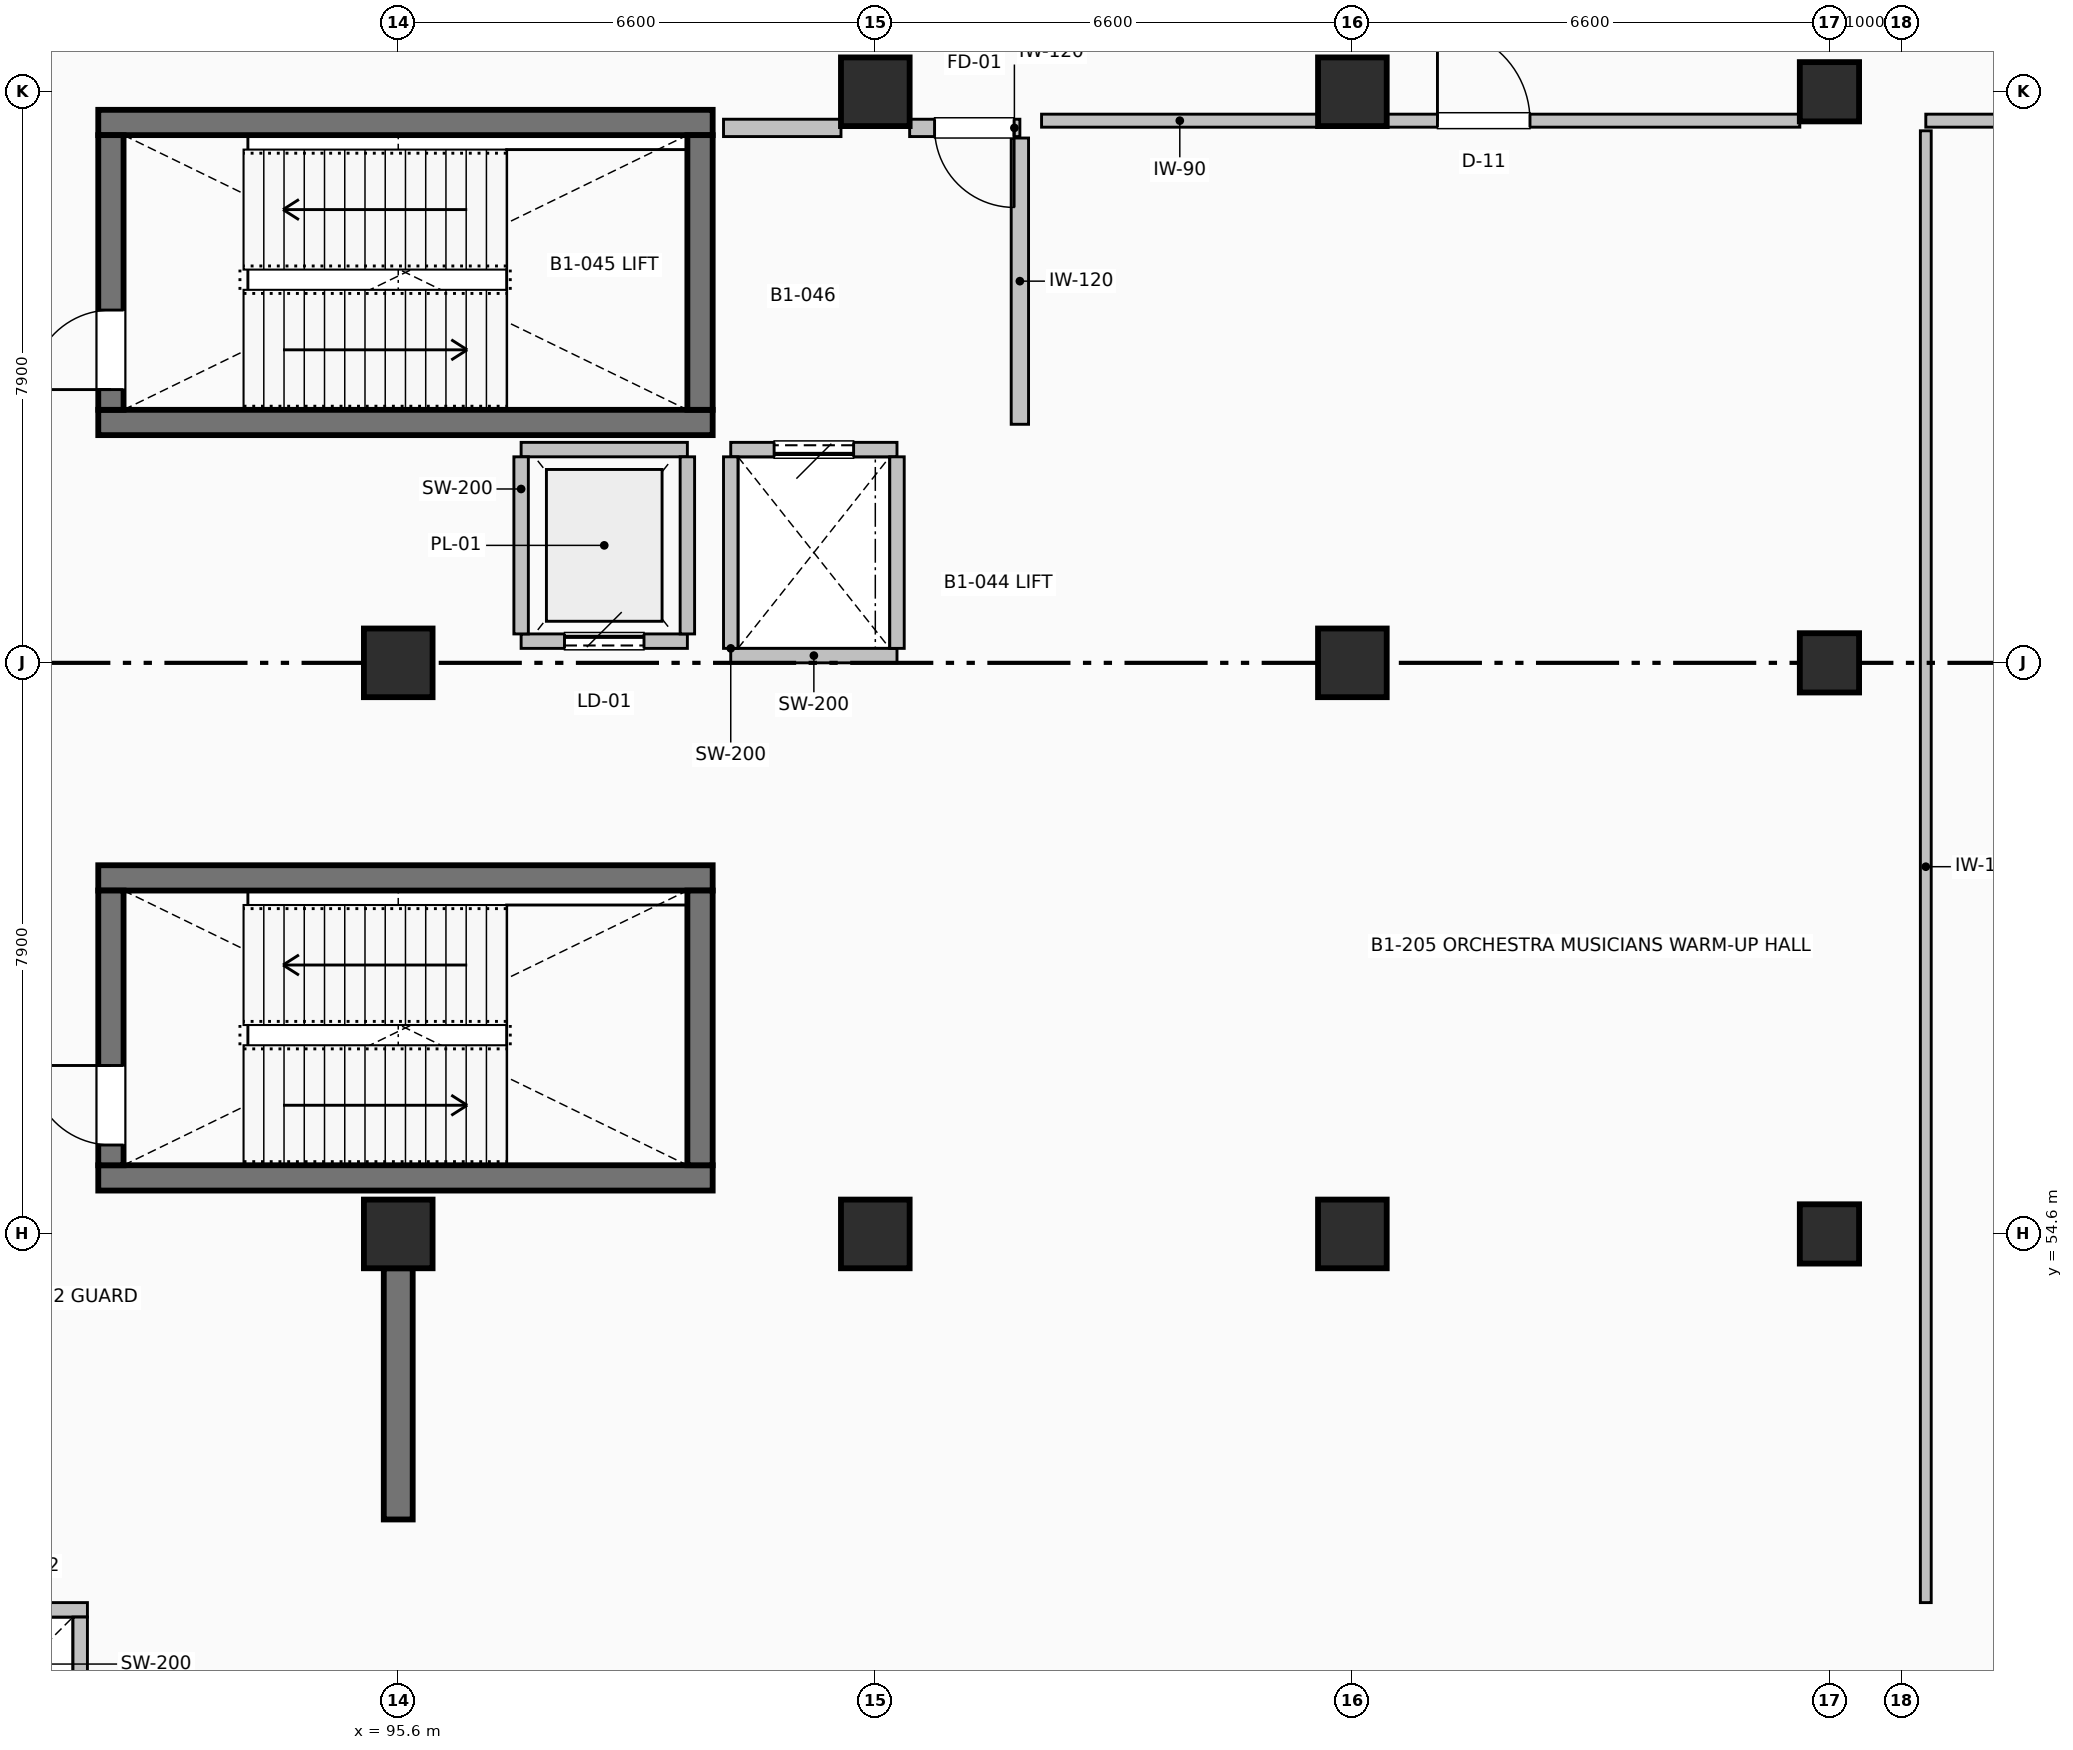
"""IFC4 building model, lengths in metres.
Left out: names, types, materials, properties, quantities, classifications, styles, units other than length and angle.
Written with IfcOpenShell. Run it as: python <this file> out.ifc"""

import sys

from ifc_helpers import new_model, si_unit, direction, frame, frame_2d, origin, origin_2d, place, context, subcontext, project, spatial, rectangle, extrude, element, fill, save


model = new_model("IFC4")
c1 = context("Model", 3, precision=1e-05, world=origin(), true_north=direction((0.0, 1.0)))
c2 = subcontext(c1, "Body", "Model", "MODEL_VIEW")
j1 = project(units=[si_unit("LENGTHUNIT", "METRE"), si_unit("PLANEANGLEUNIT", "RADIAN")], contexts=[c1])
p1 = place(None, origin())
s1 = spatial("IfcSite", under=j1, at=p1, CompositionType="ELEMENT")
p2 = place(p1, origin())
s2 = spatial("IfcBuilding", under=s1, at=p2, CompositionType="ELEMENT")
p3 = place(p2, frame((0.0, 0.0, -4.8)))
s3 = spatial("IfcBuildingStorey", under=s2, at=p3, CompositionType="ELEMENT", Elevation=-4.8)
for number, where, z_axis, x_axis in (
    (1, (95.6, 54.6, 0.0), (0.0, 0.0, 1.0), (1.0, 0.0, 0.0)),
    (2, (95.6, 62.5, 0.0), (0.0, 0.0, 1.0), (1.0, 0.0, 0.0)),
    (3, (102.2, 54.6, 0.0), (0.0, 0.0, 1.0), (1.0, 0.0, 0.0)),
    (4, (102.2, 70.4, 0.0), (0.0, 0.0, 1.0), (1.0, 0.0, 0.0)),
    (5, (108.8, 54.6, 0.0), (0.0, 0.0, 1.0), (1.0, 0.0, 0.0)),
    (6, (108.8, 62.5, 0.0), (0.0, 0.0, 1.0), (1.0, 0.0, 0.0)),
    (7, (108.8, 70.4, 0.0), (0.0, 0.0, 1.0), (1.0, 0.0, 0.0)),
):
    element("IfcColumn", number, at=place(p3, frame(where, z_axis=z_axis, x_axis=x_axis)), inside=s3, PredefinedType="COLUMN", context=c2, shape_type="SweptSolid", body=[
        extrude(rectangle(XDim=0.95, YDim=0.95, at=origin_2d()), origin(), (0.0, 0.0, 1.0), 4.8),
    ])
for number, where, z_axis, x_axis in (
    (8, (115.4, 54.6, 0.0), (0.0, 0.0, 1.0), (1.0, 0.0, 0.0)),
    (9, (115.4, 62.5, 0.0), (0.0, 0.0, 1.0), (1.0, 0.0, 0.0)),
    (10, (115.4, 70.4, 0.0), (0.0, 0.0, 1.0), (1.0, 0.0, 0.0)),
):
    element("IfcColumn", number, at=place(p3, frame(where, z_axis=z_axis, x_axis=x_axis)), inside=s3, PredefinedType="COLUMN", context=c2, shape_type="SweptSolid", body=[
        extrude(rectangle(XDim=0.82, YDim=0.82, at=origin_2d()), origin(), (0.0, 0.0, 1.0), 4.8),
    ])
for number, where, z_axis, x_axis in (
    (11, (91.45, 65.825, 0.0), (0.0, 0.0, 1.0), (1.0, 0.0, 0.0)),
    (12, (99.95, 69.975, 0.0), (0.0, 0.0, 1.0), (-1.0, 0.0, 0.0)),
):
    element("IfcWall", number, at=place(p3, frame(where, z_axis=z_axis, x_axis=x_axis)), inside=s3, PredefinedType="SHEAR", context=c2, shape_type="SweptSolid", body=[
        extrude(rectangle(XDim=8.5, YDim=0.35, at=frame_2d((4.25, 0.0))), origin(), (0.0, 0.0, 1.0), 4.48),
    ])
p4 = place(p3, frame((91.625, 66.0, 0.0), z_axis=(0.0, 0.0, 1.0), x_axis=(0.0, 1.0, 0.0)))
e13 = element("IfcWall", 13, at=p4, inside=s3, PredefinedType="SHEAR", context=c2, shape_type="SweptSolid", body=[
    extrude(rectangle(XDim=3.8, YDim=0.35, at=frame_2d((1.9, 0.0))), origin(), (0.0, 0.0, 1.0), 4.48),
])
p5 = place(p4, frame((0.28, 0.0, 0.0)))
e14 = element("IfcOpeningElement", 14, at=p5, cuts=e13, PredefinedType="OPENING", context=c2, shape_type="SweptSolid", body=[
    extrude(rectangle(XDim=1.1, YDim=2.08, at=frame_2d((0.55, 1.04))), frame((0.0, 0.185, 0.0), z_axis=(0.0, -1.0, 0.0), x_axis=(1.0, 0.0, 0.0)), (0.0, 0.0, 1.0), 0.37),
])
p6 = place(p3, frame((99.775, 69.8, 0.0), z_axis=(0.0, 0.0, 1.0), x_axis=(0.0, -1.0, 0.0)))
e15 = element("IfcWall", 15, at=p6, inside=s3, PredefinedType="SHEAR", context=c2, shape_type="SweptSolid", body=[
    extrude(rectangle(XDim=3.8, YDim=0.35, at=frame_2d((1.9, 0.0))), origin(), (0.0, 0.0, 1.0), 4.48),
])
for number, where, z_axis, x_axis in (
    (16, (91.45, 55.375, 0.0), (0.0, 0.0, 1.0), (1.0, 0.0, 0.0)),
    (17, (99.95, 59.525, 0.0), (0.0, 0.0, 1.0), (-1.0, 0.0, 0.0)),
):
    element("IfcWall", number, at=place(p3, frame(where, z_axis=z_axis, x_axis=x_axis)), inside=s3, PredefinedType="SHEAR", context=c2, shape_type="SweptSolid", body=[
        extrude(rectangle(XDim=8.5, YDim=0.35, at=frame_2d((4.25, 0.0))), origin(), (0.0, 0.0, 1.0), 4.48),
    ])
p7 = place(p3, frame((91.625, 55.55, 0.0), z_axis=(0.0, 0.0, 1.0), x_axis=(0.0, 1.0, 0.0)))
e18 = element("IfcWall", 18, at=p7, inside=s3, PredefinedType="SHEAR", context=c2, shape_type="SweptSolid", body=[
    extrude(rectangle(XDim=3.8, YDim=0.35, at=frame_2d((1.9, 0.0))), origin(), (0.0, 0.0, 1.0), 4.48),
])
p8 = place(p7, frame((0.28, 0.0, 0.0)))
e19 = element("IfcOpeningElement", 19, at=p8, cuts=e18, PredefinedType="OPENING", context=c2, shape_type="SweptSolid", body=[
    extrude(rectangle(XDim=1.1, YDim=2.08, at=frame_2d((0.55, 1.04))), frame((0.0, 0.185, 0.0), z_axis=(0.0, -1.0, 0.0), x_axis=(1.0, 0.0, 0.0)), (0.0, 0.0, 1.0), 0.37),
])
p9 = place(p3, frame((99.775, 59.35, 0.0), z_axis=(0.0, 0.0, 1.0), x_axis=(0.0, -1.0, 0.0)))
e20 = element("IfcWall", 20, at=p9, inside=s3, PredefinedType="SHEAR", context=c2, shape_type="SweptSolid", body=[
    extrude(rectangle(XDim=3.8, YDim=0.35, at=frame_2d((1.9, 0.0))), origin(), (0.0, 0.0, 1.0), 4.48),
])
p10 = place(p3, frame((95.6, 50.65, 0.0), z_axis=(0.0, 0.0, 1.0), x_axis=(0.0, 1.0, 0.0)))
e21 = element("IfcWall", 21, at=p10, inside=s3, PredefinedType="SHEAR", context=c2, shape_type="SweptSolid", body=[
    extrude(rectangle(XDim=3.475, YDim=0.4, at=frame_2d((1.738, 0.0))), origin(), (0.0, 0.0, 1.0), 4.48),
])
p11 = place(p3, frame((91.3, 49.4, 0.0), z_axis=(0.0, 0.0, 1.0), x_axis=(-1.0, 0.0, 0.0)))
e22 = element("IfcWall", 22, at=p11, inside=s3, PredefinedType="PARTITIONING", context=c2, shape_type="SweptSolid", body=[
    extrude(rectangle(XDim=1.7, YDim=0.2, at=frame_2d((0.85, 0.0))), origin(), (0.0, 0.0, 1.0), 4.5),
])
p12 = place(p3, frame((91.2, 49.3, 0.0), z_axis=(0.0, 0.0, 1.0), x_axis=(0.0, -1.0, 0.0)))
e23 = element("IfcWall", 23, at=p12, inside=s3, PredefinedType="PARTITIONING", context=c2, shape_type="SweptSolid", body=[
    extrude(rectangle(XDim=1.3, YDim=0.2, at=frame_2d((0.65, 0.0))), origin(), (0.0, 0.0, 1.0), 4.5),
])
p13 = place(p3, frame((100.2, 62.6, 0.0), z_axis=(0.0, 0.0, 1.0), x_axis=(1.0, 0.0, 0.0)))
e24 = element("IfcWall", 24, at=p13, inside=s3, PredefinedType="PARTITIONING", context=c2, shape_type="SweptSolid", body=[
    extrude(rectangle(XDim=2.3, YDim=0.2, at=frame_2d((1.15, 0.0))), origin(), (0.0, 0.0, 1.0), 3.272),
])
p14 = place(p3, frame((102.5, 65.45, 0.0), z_axis=(0.0, 0.0, 1.0), x_axis=(-1.0, 0.0, 0.0)))
e25 = element("IfcWall", 25, at=p14, inside=s3, PredefinedType="PARTITIONING", context=c2, shape_type="SweptSolid", body=[
    extrude(rectangle(XDim=2.3, YDim=0.2, at=frame_2d((1.15, 0.0))), origin(), (0.0, 0.0, 1.0), 4.472),
])
p15 = place(p14, frame((0.6, 0.0, 0.0)))
e26 = element("IfcOpeningElement", 26, at=p15, cuts=e25, PredefinedType="OPENING", context=c2, shape_type="SweptSolid", body=[
    extrude(rectangle(XDim=1.1, YDim=2.15, at=frame_2d((0.55, 1.075))), frame((0.0, 0.11, 0.0), z_axis=(0.0, -1.0, 0.0), x_axis=(1.0, 0.0, 0.0)), (0.0, 0.0, 1.0), 0.22),
])
for number, where, z_axis, x_axis in (
    (27, (100.2, 62.7, 0.0), (0.0, 0.0, 1.0), (0.0, 1.0, 0.0)),
    (28, (102.5, 65.35, 0.0), (0.0, 0.0, 1.0), (0.0, -1.0, 0.0)),
):
    element("IfcWall", number, at=place(p3, frame(where, z_axis=z_axis, x_axis=x_axis)), inside=s3, PredefinedType="PARTITIONING", context=c2, shape_type="SweptSolid", body=[
        extrude(rectangle(XDim=2.65, YDim=0.2, at=frame_2d((1.325, 0.0))), origin(), (0.0, 0.0, 1.0), 4.472),
    ])
p16 = place(p3, frame((97.3, 62.8, 0.0), z_axis=(0.0, 0.0, 1.0), x_axis=(1.0, 0.0, 0.0)))
e29 = element("IfcWall", 29, at=p16, inside=s3, PredefinedType="PARTITIONING", context=c2, shape_type="SweptSolid", body=[
    extrude(rectangle(XDim=2.3, YDim=0.2, at=frame_2d((1.15, 0.0))), origin(), (0.0, 0.0, 1.0), 3.272),
])
p17 = place(p16, frame((0.6, 0.0, 0.0)))
e30 = element("IfcOpeningElement", 30, at=p17, cuts=e29, PredefinedType="OPENING", context=c2, shape_type="SweptSolid", body=[
    extrude(rectangle(XDim=1.1, YDim=2.15, at=frame_2d((0.55, 1.075))), frame((0.0, 0.11, 0.0), z_axis=(0.0, -1.0, 0.0), x_axis=(1.0, 0.0, 0.0)), (0.0, 0.0, 1.0), 0.22),
])
p18 = place(p3, frame((99.6, 65.45, 0.0), z_axis=(0.0, 0.0, 1.0), x_axis=(-1.0, 0.0, 0.0)))
e31 = element("IfcWall", 31, at=p18, inside=s3, PredefinedType="PARTITIONING", context=c2, shape_type="SweptSolid", body=[
    extrude(rectangle(XDim=2.3, YDim=0.2, at=frame_2d((1.15, 0.0))), origin(), (0.0, 0.0, 1.0), 4.472),
])
for number, where, z_axis, x_axis in (
    (32, (97.3, 62.9, 0.0), (0.0, 0.0, 1.0), (0.0, 1.0, 0.0)),
    (33, (99.6, 65.35, 0.0), (0.0, 0.0, 1.0), (0.0, -1.0, 0.0)),
):
    element("IfcWall", number, at=place(p3, frame(where, z_axis=z_axis, x_axis=x_axis)), inside=s3, PredefinedType="PARTITIONING", context=c2, shape_type="SweptSolid", body=[
        extrude(rectangle(XDim=2.45, YDim=0.2, at=frame_2d((1.225, 0.0))), origin(), (0.0, 0.0, 1.0), 4.472),
    ])
p19 = place(p3, frame((104.2, 69.9, 0.0), z_axis=(0.0, 0.0, 1.0), x_axis=(-1.0, 0.0, 0.0)))
e34 = element("IfcWall", 34, at=p19, inside=s3, PredefinedType="PARTITIONING", context=c2, shape_type="SweptSolid", body=[
    extrude(rectangle(XDim=1.525, YDim=0.24, at=frame_2d((0.762, 0.0))), origin(), (0.0, 0.0, 1.0), 4.472),
])
p20 = place(p19, frame((0.08, 0.0, 0.0)))
e35 = element("IfcOpeningElement", 35, at=p20, cuts=e34, PredefinedType="OPENING", context=c2, shape_type="SweptSolid", body=[
    extrude(rectangle(XDim=1.1, YDim=2.08, at=frame_2d((0.55, 1.04))), frame((0.0, 0.13, 0.0), z_axis=(0.0, -1.0, 0.0), x_axis=(1.0, 0.0, 0.0)), (0.0, 0.0, 1.0), 0.26),
])
p21 = place(p3, frame((101.725, 69.9, 0.0), z_axis=(0.0, 0.0, 1.0), x_axis=(-1.0, 0.0, 0.0)))
e36 = element("IfcWall", 36, at=p21, inside=s3, PredefinedType="PARTITIONING", context=c2, shape_type="SweptSolid", body=[
    extrude(rectangle(XDim=1.625, YDim=0.24, at=frame_2d((0.812, 0.0))), origin(), (0.0, 0.0, 1.0), 4.472),
])
p22 = place(p3, frame((104.2, 69.76, 0.0), z_axis=(0.0, 0.0, 1.0), x_axis=(0.0, -1.0, 0.0)))
e37 = element("IfcWall", 37, at=p22, inside=s3, PredefinedType="PARTITIONING", context=c2, shape_type="SweptSolid", body=[
    extrude(rectangle(XDim=3.96, YDim=0.24, at=frame_2d((1.98, 0.0))), origin(), (0.0, 0.0, 1.0), 4.472),
])
p23 = place(p3, frame((104.5, 70.0, 0.0), z_axis=(0.0, 0.0, 1.0), x_axis=(1.0, 0.0, 0.0)))
e38 = element("IfcWall", 38, at=p23, inside=s3, PredefinedType="PARTITIONING", context=c2, shape_type="SweptSolid", body=[
    extrude(rectangle(XDim=3.825, YDim=0.18, at=frame_2d((1.913, 0.0))), origin(), (0.0, 0.0, 1.0), 4.472),
])
p24 = place(p3, frame((109.275, 70.0, 0.0), z_axis=(0.0, 0.0, 1.0), x_axis=(1.0, 0.0, 0.0)))
e39 = element("IfcWall", 39, at=p24, inside=s3, PredefinedType="PARTITIONING", context=c2, shape_type="SweptSolid", body=[
    extrude(rectangle(XDim=5.715, YDim=0.18, at=frame_2d((2.857, 0.0))), origin(), (0.0, 0.0, 1.0), 4.472),
])
p25 = place(p24, frame((0.702, 0.0, 0.0)))
e40 = element("IfcOpeningElement", 40, at=p25, cuts=e39, PredefinedType="OPENING", context=c2, shape_type="SweptSolid", body=[
    extrude(rectangle(XDim=1.28, YDim=2.14, at=frame_2d((0.64, 1.07))), frame((0.0, 0.1, 0.0), z_axis=(0.0, -1.0, 0.0), x_axis=(1.0, 0.0, 0.0)), (0.0, 0.0, 1.0), 0.2),
])
p26 = place(p3, frame((116.733, 49.5, 0.0), z_axis=(0.0, 0.0, 1.0), x_axis=(0.0, 1.0, 0.0)))
e41 = element("IfcWall", 41, at=p26, inside=s3, PredefinedType="PARTITIONING", context=c2, shape_type="SweptSolid", body=[
    extrude(rectangle(XDim=20.36, YDim=0.15, at=frame_2d((10.18, 0.0))), origin(), (0.0, 0.0, 1.0), 4.472),
])
p27 = place(p3, frame((116.733, 70.0, 0.0), z_axis=(0.0, 0.0, 1.0), x_axis=(1.0, 0.0, 0.0)))
e42 = element("IfcWall", 42, at=p27, inside=s3, PredefinedType="PARTITIONING", context=c2, shape_type="SweptSolid", body=[
    extrude(rectangle(XDim=4.792, YDim=0.18, at=frame_2d((2.396, 0.0))), origin(), (0.0, 0.0, 1.0), 4.472),
])
p28 = place(p5, origin())
e43 = element("IfcDoor", 43, at=p28, inside=s3, OperationType="SINGLE_SWING_LEFT", PredefinedType="DOOR", context=c2, shape_type="SweptSolid", body=[
    extrude(rectangle(XDim=1.1, YDim=2.08, at=frame_2d((0.55, 1.04))), frame((0.0, 0.025, 0.0), z_axis=(0.0, -1.0, 0.0), x_axis=(1.0, 0.0, 0.0)), (0.0, 0.0, 1.0), 0.05),
])
fill(e14, e43)
p29 = place(p8, origin())
e44 = element("IfcDoor", 44, at=p29, inside=s3, OperationType="SINGLE_SWING_RIGHT", PredefinedType="DOOR", context=c2, shape_type="SweptSolid", body=[
    extrude(rectangle(XDim=1.1, YDim=2.08, at=frame_2d((0.55, 1.04))), frame((0.0, 0.025, 0.0), z_axis=(0.0, -1.0, 0.0), x_axis=(1.0, 0.0, 0.0)), (0.0, 0.0, 1.0), 0.05),
])
fill(e19, e44)
p30 = place(p15, origin())
e45 = element("IfcDoor", 45, at=p30, inside=s3, OperationType="SLIDING_TO_LEFT", PredefinedType="DOOR", context=c2, shape_type="SweptSolid", body=[
    extrude(rectangle(XDim=1.1, YDim=2.15, at=frame_2d((0.55, 1.075))), frame((0.0, 0.025, 0.0), z_axis=(0.0, -1.0, 0.0), x_axis=(1.0, 0.0, 0.0)), (0.0, 0.0, 1.0), 0.05),
])
fill(e26, e45)
p31 = place(p17, origin())
e46 = element("IfcDoor", 46, at=p31, inside=s3, OperationType="SLIDING_TO_LEFT", PredefinedType="DOOR", context=c2, shape_type="SweptSolid", body=[
    extrude(rectangle(XDim=1.1, YDim=2.15, at=frame_2d((0.55, 1.075))), frame((0.0, 0.025, 0.0), z_axis=(0.0, -1.0, 0.0), x_axis=(1.0, 0.0, 0.0)), (0.0, 0.0, 1.0), 0.05),
])
fill(e30, e46)
p32 = place(p20, origin())
e47 = element("IfcDoor", 47, at=p32, inside=s3, OperationType="SINGLE_SWING_LEFT", PredefinedType="DOOR", context=c2, shape_type="SweptSolid", body=[
    extrude(rectangle(XDim=1.1, YDim=2.08, at=frame_2d((0.55, 1.04))), frame((0.0, 0.025, 0.0), z_axis=(0.0, -1.0, 0.0), x_axis=(1.0, 0.0, 0.0)), (0.0, 0.0, 1.0), 0.05),
])
fill(e35, e47)
p33 = place(p25, origin())
e48 = element("IfcDoor", 48, at=p33, inside=s3, OperationType="SINGLE_SWING_LEFT", PredefinedType="DOOR", context=c2, shape_type="SweptSolid", body=[
    extrude(rectangle(XDim=1.28, YDim=2.14, at=frame_2d((0.64, 1.07))), frame((0.0, 0.025, 0.0), z_axis=(0.0, -1.0, 0.0), x_axis=(1.0, 0.0, 0.0)), (0.0, 0.0, 1.0), 0.05),
])
fill(e40, e48)
save(model, sys.argv[1])
